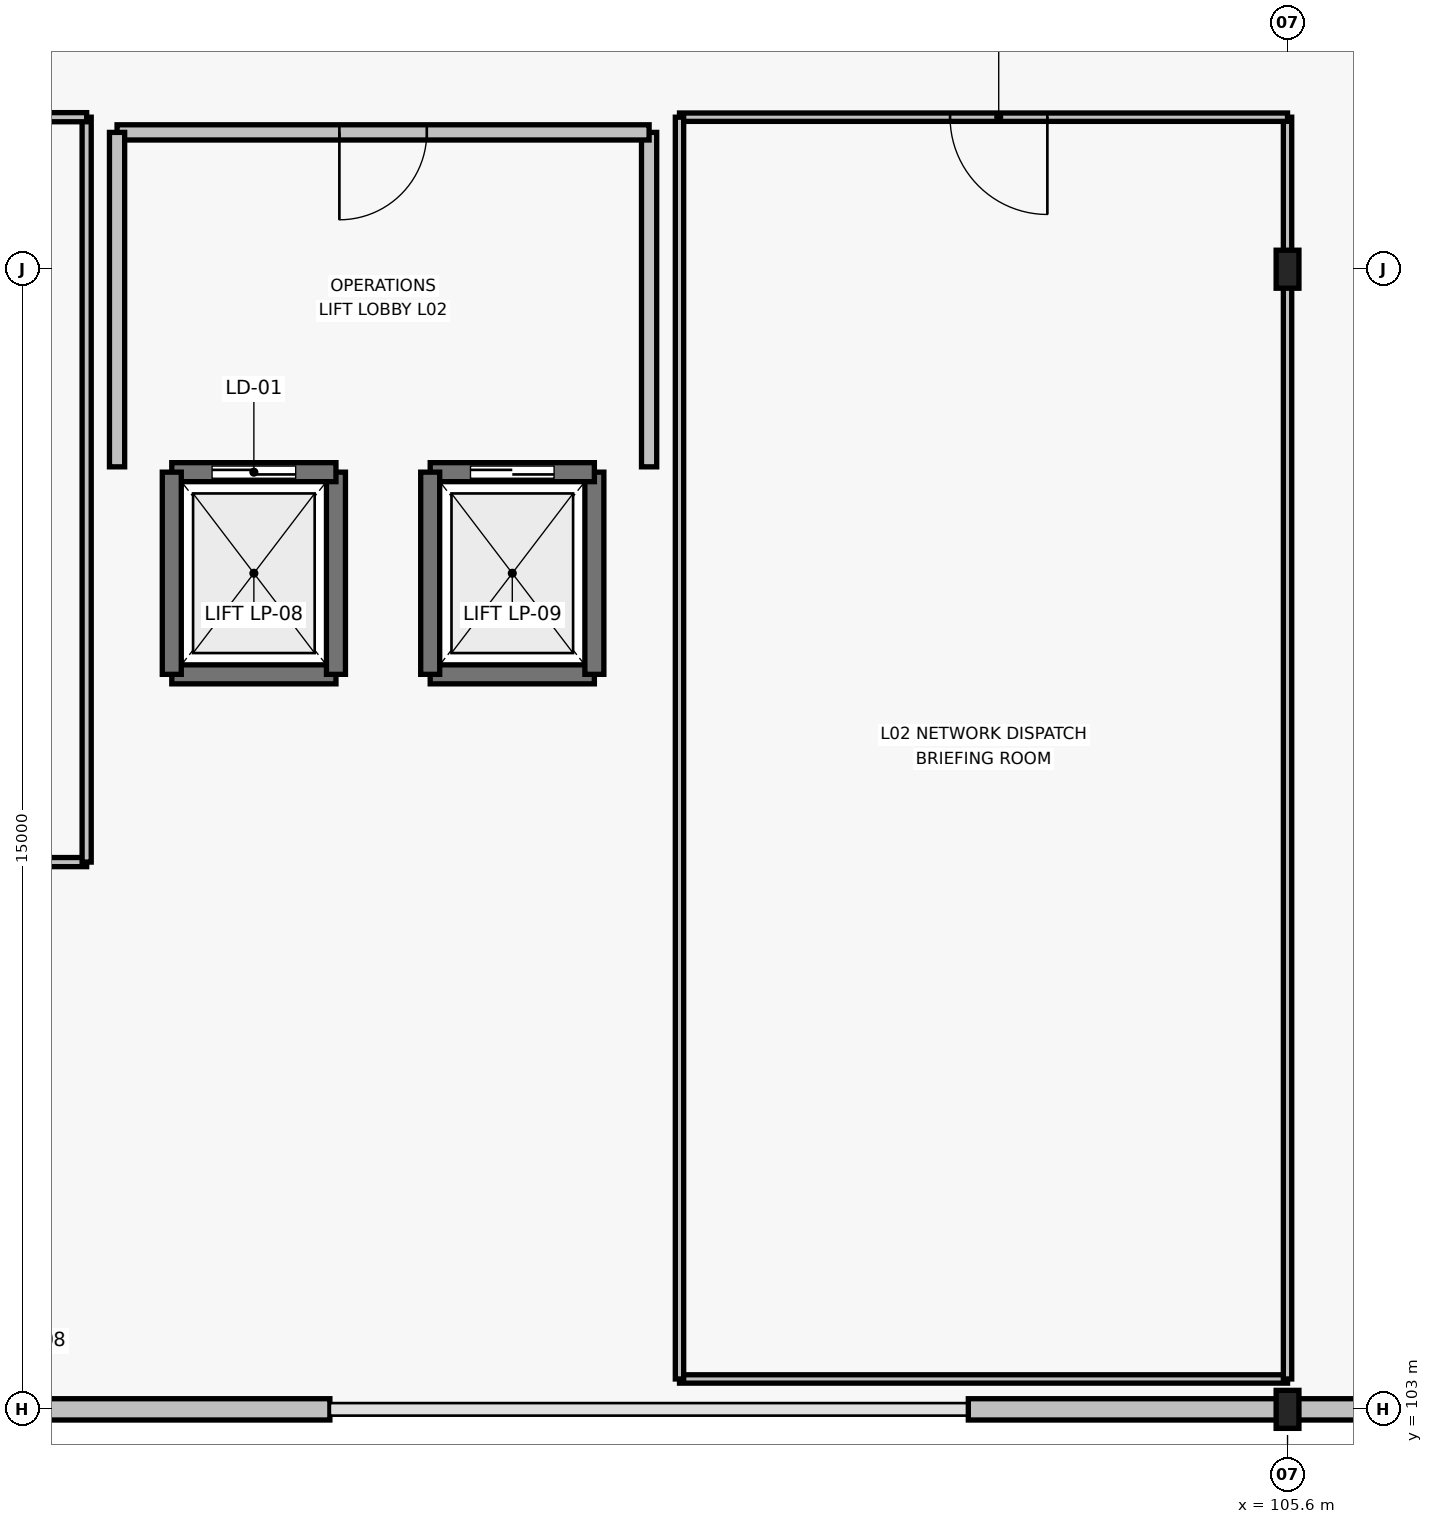
"""IFC4 building model, lengths in metres.
Left out: names, types, materials, properties, quantities, classifications, styles, units other than length and angle.
Written with IfcOpenShell. Run it as: python <this file> out.ifc"""

import sys

from ifc_helpers import new_model, si_unit, direction, frame, frame_2d, origin, origin_2d, place, context, subcontext, project, spatial, rectangle, i_section, extrude, element, fill, save


model = new_model("IFC4")
c1 = context("Model", 3, precision=1e-05, world=origin(), true_north=direction((0.0, 1.0)))
c2 = subcontext(c1, "Body", "Model", "MODEL_VIEW")
j1 = project(units=[si_unit("LENGTHUNIT", "METRE"), si_unit("PLANEANGLEUNIT", "RADIAN")], contexts=[c1])
p1 = place(None, origin())
s1 = spatial("IfcSite", under=j1, at=p1, CompositionType="ELEMENT")
p2 = place(p1, origin())
s2 = spatial("IfcBuilding", under=s1, at=p2, CompositionType="ELEMENT")
p3 = place(p2, frame((0.0, 0.0, 10.8)))
s3 = spatial("IfcBuildingStorey", under=s2, at=p3, CompositionType="ELEMENT", Elevation=10.8)
for number, where, z_axis, x_axis in (
    (1, (105.6, 103.0, 0.0), (0.0, 0.0, 1.0), (1.0, 0.0, 0.0)),
    (2, (105.6, 118.0, 0.0), (0.0, 0.0, 1.0), (1.0, 0.0, 0.0)),
):
    element("IfcColumn", number, at=place(p3, frame(where, z_axis=z_axis, x_axis=x_axis)), inside=s3, PredefinedType="COLUMN", context=c2, shape_type="SweptSolid", body=[
        extrude(i_section(OverallWidth=0.3, OverallDepth=0.5, WebThickness=0.014, FlangeThickness=0.028, FilletRadius=0.027, at=origin_2d()), origin(), (0.0, 0.0, 1.0), 6.0),
    ])
p4 = place(p3, frame((88.8, 103.0, 0.0), z_axis=(0.0, 0.0, 1.0), x_axis=(1.0, 0.0, 0.0)))
e3 = element("IfcWall", 3, at=p4, inside=s3, PredefinedType="STANDARD", context=c2, shape_type="SweptSolid", body=[
    extrude(rectangle(XDim=4.2, YDim=0.28, at=frame_2d((2.1, 0.0))), origin(), (0.0, 0.0, 1.0), 5.325),
])
p5 = place(p3, frame((101.4, 103.0, 0.0), z_axis=(0.0, 0.0, 1.0), x_axis=(1.0, 0.0, 0.0)))
e4 = element("IfcWall", 4, at=p5, inside=s3, PredefinedType="STANDARD", context=c2, shape_type="SweptSolid", body=[
    extrude(rectangle(XDim=4.2, YDim=0.28, at=frame_2d((2.1, 0.0))), origin(), (0.0, 0.0, 1.0), 5.325),
])
p6 = place(p3, frame((105.6, 103.0, 0.0), z_axis=(0.0, 0.0, 1.0), x_axis=(1.0, 0.0, 0.0)))
e5 = element("IfcWall", 5, at=p6, inside=s3, PredefinedType="STANDARD", context=c2, shape_type="SweptSolid", body=[
    extrude(rectangle(XDim=4.2, YDim=0.28, at=frame_2d((2.1, 0.0))), origin(), (0.0, 0.0, 1.0), 5.325),
])
p7 = place(p3, frame((90.92, 112.67, 0.0), z_axis=(0.0, 0.0, 1.0), x_axis=(1.0, 0.0, 0.0)))
e6 = element("IfcWall", 6, at=p7, inside=s3, PredefinedType="SHEAR", context=c2, shape_type="SweptSolid", body=[
    extrude(rectangle(XDim=2.16, YDim=0.25, at=frame_2d((1.08, 0.0))), origin(), (0.0, 0.0, 1.0), 5.8),
])
p8 = place(p3, frame((93.08, 112.67, 0.0), z_axis=(0.0, 0.0, 1.0), x_axis=(0.0, 1.0, 0.0)))
e7 = element("IfcWall", 7, at=p8, inside=s3, PredefinedType="SHEAR", context=c2, shape_type="SweptSolid", body=[
    extrude(rectangle(XDim=2.66, YDim=0.25, at=frame_2d((1.33, 0.0))), origin(), (0.0, 0.0, 1.0), 5.8),
])
p9 = place(p3, frame((93.08, 115.33, 0.0), z_axis=(0.0, 0.0, 1.0), x_axis=(-1.0, 0.0, 0.0)))
e8 = element("IfcWall", 8, at=p9, inside=s3, PredefinedType="SHEAR", context=c2, shape_type="SweptSolid", body=[
    extrude(rectangle(XDim=2.16, YDim=0.25, at=frame_2d((1.08, 0.0))), origin(), (0.0, 0.0, 1.0), 5.8),
])
p10 = place(p9, frame((0.53, 0.0, 0.0)))
e9 = element("IfcOpeningElement", 9, at=p10, cuts=e8, PredefinedType="OPENING", context=c2, shape_type="SweptSolid", body=[
    extrude(rectangle(XDim=1.1, YDim=2.2, at=frame_2d((0.55, 1.1))), frame((0.0, 0.135, 0.0), z_axis=(0.0, -1.0, 0.0), x_axis=(1.0, 0.0, 0.0)), (0.0, 0.0, 1.0), 0.27),
])
p11 = place(p3, frame((90.92, 115.33, 0.0), z_axis=(0.0, 0.0, 1.0), x_axis=(0.0, -1.0, 0.0)))
e10 = element("IfcWall", 10, at=p11, inside=s3, PredefinedType="SHEAR", context=c2, shape_type="SweptSolid", body=[
    extrude(rectangle(XDim=2.66, YDim=0.25, at=frame_2d((1.33, 0.0))), origin(), (0.0, 0.0, 1.0), 5.8),
])
p12 = place(p3, frame((94.32, 112.67, 0.0), z_axis=(0.0, 0.0, 1.0), x_axis=(1.0, 0.0, 0.0)))
e11 = element("IfcWall", 11, at=p12, inside=s3, PredefinedType="SHEAR", context=c2, shape_type="SweptSolid", body=[
    extrude(rectangle(XDim=2.16, YDim=0.25, at=frame_2d((1.08, 0.0))), origin(), (0.0, 0.0, 1.0), 5.8),
])
p13 = place(p3, frame((96.48, 112.67, 0.0), z_axis=(0.0, 0.0, 1.0), x_axis=(0.0, 1.0, 0.0)))
e12 = element("IfcWall", 12, at=p13, inside=s3, PredefinedType="SHEAR", context=c2, shape_type="SweptSolid", body=[
    extrude(rectangle(XDim=2.66, YDim=0.25, at=frame_2d((1.33, 0.0))), origin(), (0.0, 0.0, 1.0), 5.8),
])
p14 = place(p3, frame((96.48, 115.33, 0.0), z_axis=(0.0, 0.0, 1.0), x_axis=(-1.0, 0.0, 0.0)))
e13 = element("IfcWall", 13, at=p14, inside=s3, PredefinedType="SHEAR", context=c2, shape_type="SweptSolid", body=[
    extrude(rectangle(XDim=2.16, YDim=0.25, at=frame_2d((1.08, 0.0))), origin(), (0.0, 0.0, 1.0), 5.8),
])
p15 = place(p14, frame((0.53, 0.0, 0.0)))
e14 = element("IfcOpeningElement", 14, at=p15, cuts=e13, PredefinedType="OPENING", context=c2, shape_type="SweptSolid", body=[
    extrude(rectangle(XDim=1.1, YDim=2.2, at=frame_2d((0.55, 1.1))), frame((0.0, 0.135, 0.0), z_axis=(0.0, -1.0, 0.0), x_axis=(1.0, 0.0, 0.0)), (0.0, 0.0, 1.0), 0.27),
])
p16 = place(p3, frame((94.32, 115.33, 0.0), z_axis=(0.0, 0.0, 1.0), x_axis=(0.0, -1.0, 0.0)))
e15 = element("IfcWall", 15, at=p16, inside=s3, PredefinedType="SHEAR", context=c2, shape_type="SweptSolid", body=[
    extrude(rectangle(XDim=2.66, YDim=0.25, at=frame_2d((1.33, 0.0))), origin(), (0.0, 0.0, 1.0), 5.8),
])
p17 = place(p3, frame((97.2, 115.4, 0.0), z_axis=(0.0, 0.0, 1.0), x_axis=(0.0, 1.0, 0.0)))
e16 = element("IfcWall", 16, at=p17, inside=s3, PredefinedType="PARTITIONING", context=c2, shape_type="SweptSolid", body=[
    extrude(rectangle(XDim=4.4, YDim=0.2, at=frame_2d((2.2, 0.0))), origin(), (0.0, 0.0, 1.0), 5.8),
])
p18 = place(p3, frame((97.2, 119.8, 0.0), z_axis=(0.0, 0.0, 1.0), x_axis=(-1.0, 0.0, 0.0)))
e17 = element("IfcWall", 17, at=p18, inside=s3, PredefinedType="PARTITIONING", context=c2, shape_type="SweptSolid", body=[
    extrude(rectangle(XDim=7.0, YDim=0.2, at=frame_2d((3.5, 0.0))), origin(), (0.0, 0.0, 1.0), 5.8),
])
p19 = place(p18, frame((4.075, 0.0, 0.0), z_axis=(0.0, 0.0, 1.0), x_axis=(-1.0, 0.0, 0.0)))
e18 = element("IfcOpeningElement", 18, at=p19, cuts=e17, PredefinedType="OPENING", context=c2, shape_type="SweptSolid", body=[
    extrude(rectangle(XDim=1.15, YDim=2.2, at=frame_2d((0.575, 1.1))), frame((0.0, 0.11, 0.0), z_axis=(0.0, -1.0, 0.0), x_axis=(1.0, 0.0, 0.0)), (0.0, 0.0, 1.0), 0.22),
])
p20 = place(p3, frame((90.2, 119.8, 0.0), z_axis=(0.0, 0.0, 1.0), x_axis=(0.0, -1.0, 0.0)))
e19 = element("IfcWall", 19, at=p20, inside=s3, PredefinedType="PARTITIONING", context=c2, shape_type="SweptSolid", body=[
    extrude(rectangle(XDim=4.4, YDim=0.2, at=frame_2d((2.2, 0.0))), origin(), (0.0, 0.0, 1.0), 5.8),
])
p21 = place(p3, frame((82.6, 110.2, 0.0), z_axis=(0.0, 0.0, 1.0), x_axis=(1.0, 0.0, 0.0)))
e20 = element("IfcWall", 20, at=p21, inside=s3, PredefinedType="PARTITIONING", context=c2, shape_type="SweptSolid", body=[
    extrude(rectangle(XDim=7.2, YDim=0.12, at=frame_2d((3.6, 0.0))), origin(), (0.0, 0.0, 1.0), 5.8),
])
p22 = place(p3, frame((89.8, 110.2, 0.0), z_axis=(0.0, 0.0, 1.0), x_axis=(0.0, 1.0, 0.0)))
e21 = element("IfcWall", 21, at=p22, inside=s3, PredefinedType="PARTITIONING", context=c2, shape_type="SweptSolid", body=[
    extrude(rectangle(XDim=9.8, YDim=0.12, at=frame_2d((4.9, 0.0))), origin(), (0.0, 0.0, 1.0), 5.8),
])
p23 = place(p3, frame((89.8, 120.0, 0.0), z_axis=(0.0, 0.0, 1.0), x_axis=(-1.0, 0.0, 0.0)))
e22 = element("IfcWall", 22, at=p23, inside=s3, PredefinedType="PARTITIONING", context=c2, shape_type="SweptSolid", body=[
    extrude(rectangle(XDim=7.2, YDim=0.12, at=frame_2d((3.6, 0.0))), origin(), (0.0, 0.0, 1.0), 5.8),
])
p24 = place(p23, frame((3.21, 0.0, 0.0)))
e23 = element("IfcOpeningElement", 23, at=p24, cuts=e22, PredefinedType="OPENING", context=c2, shape_type="SweptSolid", body=[
    extrude(rectangle(XDim=1.18, YDim=2.18, at=frame_2d((0.59, 1.09))), frame((0.0, 0.07, 0.0), z_axis=(0.0, -1.0, 0.0), x_axis=(1.0, 0.0, 0.0)), (0.0, 0.0, 1.0), 0.14),
])
p25 = place(p3, frame((97.6, 103.4, 0.0), z_axis=(0.0, 0.0, 1.0), x_axis=(1.0, 0.0, 0.0)))
e24 = element("IfcWall", 24, at=p25, inside=s3, PredefinedType="MOVABLE", context=c2, shape_type="SweptSolid", body=[
    extrude(rectangle(XDim=8.0, YDim=0.11, at=frame_2d((4.0, 0.0))), origin(), (0.0, 0.0, 1.0), 5.325),
])
p26 = place(p3, frame((105.6, 103.4, 0.0), z_axis=(0.0, 0.0, 1.0), x_axis=(0.0, 1.0, 0.0)))
e25 = element("IfcWall", 25, at=p26, inside=s3, PredefinedType="MOVABLE", context=c2, shape_type="SweptSolid", body=[
    extrude(rectangle(XDim=16.6, YDim=0.11, at=frame_2d((8.3, 0.0))), origin(), (0.0, 0.0, 1.0), 5.295),
])
p27 = place(p3, frame((105.6, 120.0, 0.0), z_axis=(0.0, 0.0, 1.0), x_axis=(-1.0, 0.0, 0.0)))
e26 = element("IfcWall", 26, at=p27, inside=s3, PredefinedType="MOVABLE", context=c2, shape_type="SweptSolid", body=[
    extrude(rectangle(XDim=8.0, YDim=0.11, at=frame_2d((4.0, 0.0))), origin(), (0.0, 0.0, 1.0), 5.8),
])
p28 = place(p27, frame((3.16, 0.0, 0.0)))
e27 = element("IfcOpeningElement", 27, at=p28, cuts=e26, PredefinedType="OPENING", context=c2, shape_type="SweptSolid", body=[
    extrude(rectangle(XDim=1.28, YDim=2.22, at=frame_2d((0.64, 1.11))), frame((0.0, 0.065, 0.0), z_axis=(0.0, -1.0, 0.0), x_axis=(1.0, 0.0, 0.0)), (0.0, 0.0, 1.0), 0.13),
])
p29 = place(p3, frame((97.6, 120.0, 0.0), z_axis=(0.0, 0.0, 1.0), x_axis=(0.0, -1.0, 0.0)))
e28 = element("IfcWall", 28, at=p29, inside=s3, PredefinedType="MOVABLE", context=c2, shape_type="SweptSolid", body=[
    extrude(rectangle(XDim=16.6, YDim=0.11, at=frame_2d((8.3, 0.0))), origin(), (0.0, 0.0, 1.0), 5.8),
])
p30 = place(p10, origin())
e29 = element("IfcDoor", 29, at=p30, inside=s3, OperationType="SLIDING_TO_RIGHT", PredefinedType="DOOR", context=c2, shape_type="SweptSolid", body=[
    extrude(rectangle(XDim=1.1, YDim=2.2, at=frame_2d((0.55, 1.1))), frame((0.0, 0.025, 0.0), z_axis=(0.0, -1.0, 0.0), x_axis=(1.0, 0.0, 0.0)), (0.0, 0.0, 1.0), 0.05),
])
fill(e9, e29)
p31 = place(p15, origin())
e30 = element("IfcDoor", 30, at=p31, inside=s3, OperationType="SLIDING_TO_RIGHT", PredefinedType="DOOR", context=c2, shape_type="SweptSolid", body=[
    extrude(rectangle(XDim=1.1, YDim=2.2, at=frame_2d((0.55, 1.1))), frame((0.0, 0.025, 0.0), z_axis=(0.0, -1.0, 0.0), x_axis=(1.0, 0.0, 0.0)), (0.0, 0.0, 1.0), 0.05),
])
fill(e14, e30)
p32 = place(p19, origin())
e31 = element("IfcDoor", 31, at=p32, inside=s3, OperationType="SINGLE_SWING_RIGHT", PredefinedType="DOOR", context=c2, shape_type="SweptSolid", body=[
    extrude(rectangle(XDim=1.15, YDim=2.2, at=frame_2d((0.575, 1.1))), frame((0.0, 0.025, 0.0), z_axis=(0.0, -1.0, 0.0), x_axis=(1.0, 0.0, 0.0)), (0.0, 0.0, 1.0), 0.05),
])
fill(e18, e31)
p33 = place(p28, origin())
e32 = element("IfcDoor", 32, at=p33, inside=s3, OperationType="SINGLE_SWING_LEFT", PredefinedType="DOOR", context=c2, shape_type="SweptSolid", body=[
    extrude(rectangle(XDim=1.28, YDim=2.22, at=frame_2d((0.64, 1.11))), frame((0.0, 0.025, 0.0), z_axis=(0.0, -1.0, 0.0), x_axis=(1.0, 0.0, 0.0)), (0.0, 0.0, 1.0), 0.05),
])
fill(e27, e32)
save(model, sys.argv[1])
